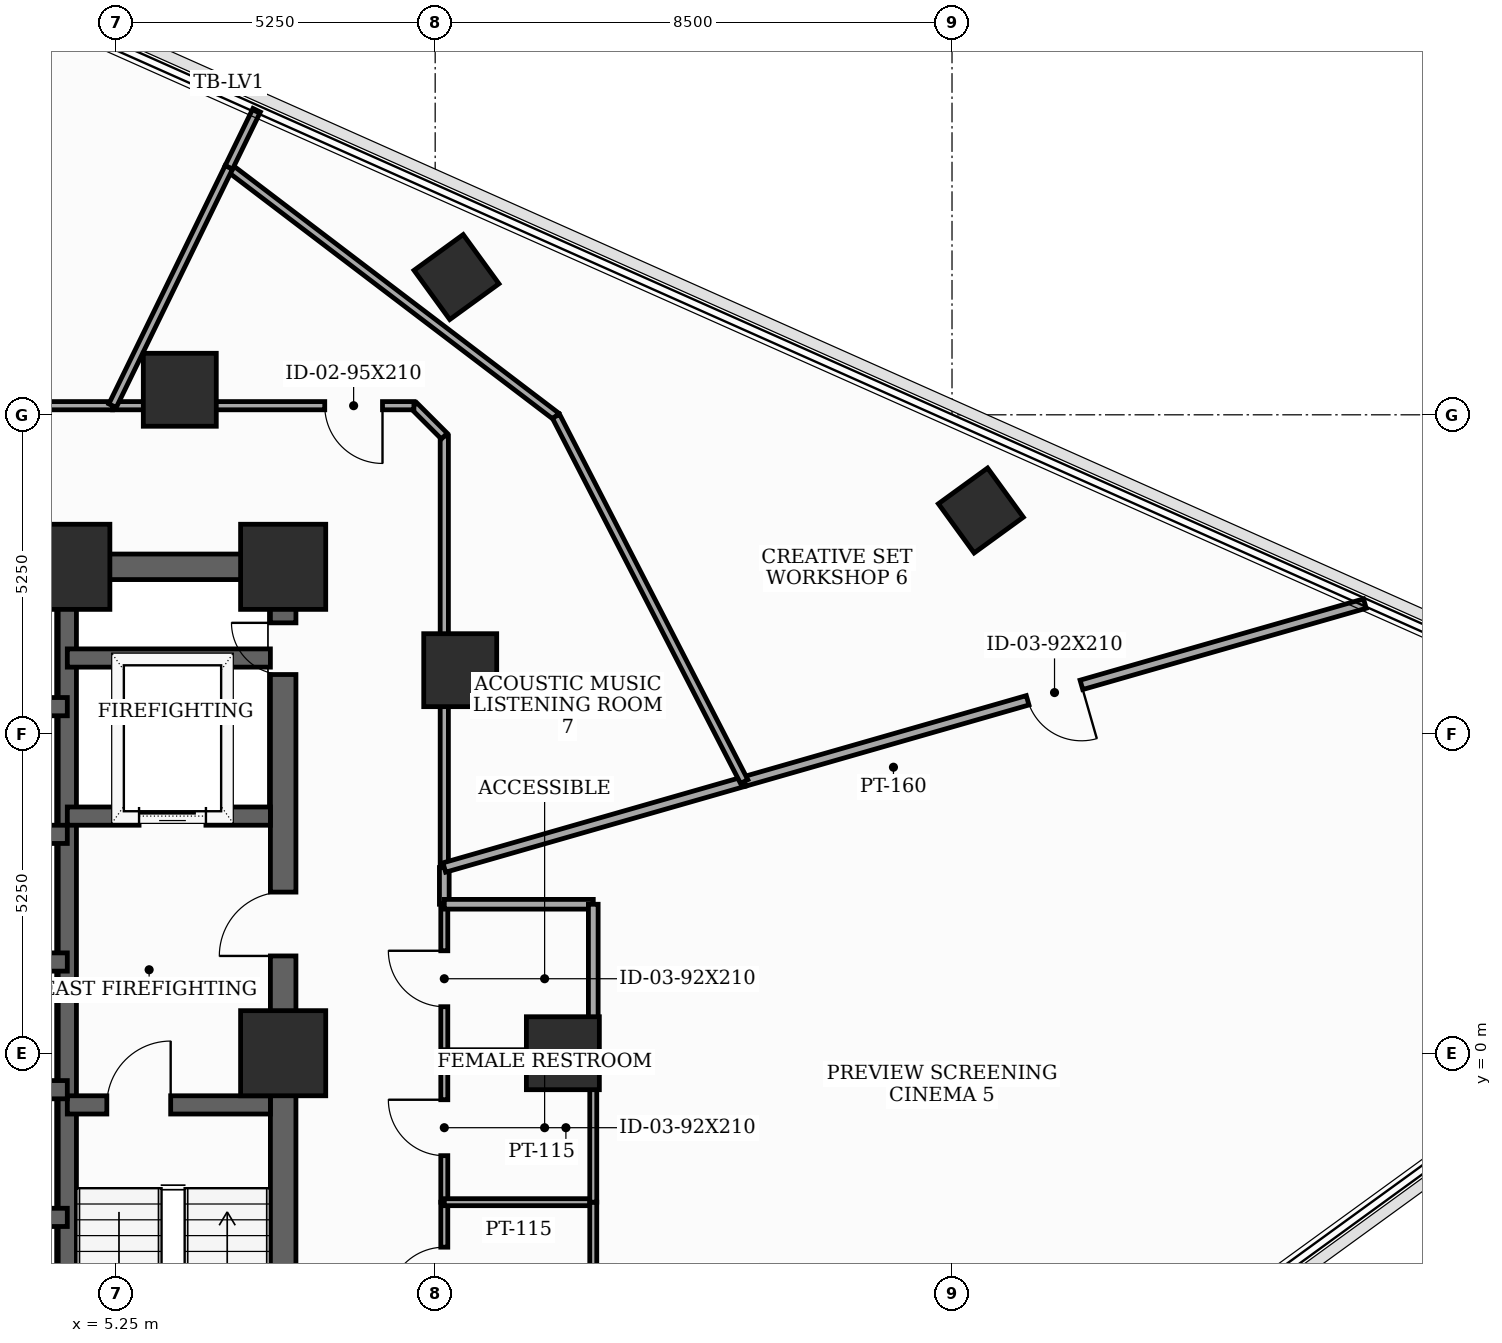
"""IFC4 building model, lengths in metres.
Left out: names, types, materials, properties, quantities, classifications, styles, units other than length and angle.
Written with IfcOpenShell. Run it as: python <this file> out.ifc"""

import sys

from ifc_helpers import new_model, si_unit, direction, frame, frame_2d, origin, origin_2d, place, context, subcontext, project, spatial, rectangle, extrude, element, fill, save


model = new_model("IFC4")
c1 = context("Model", 3, precision=1e-05, world=origin(), true_north=direction((0.0, 1.0)))
c2 = subcontext(c1, "Body", "Model", "MODEL_VIEW")
j1 = project(units=[si_unit("LENGTHUNIT", "METRE"), si_unit("PLANEANGLEUNIT", "RADIAN")], contexts=[c1])
p1 = place(None, origin())
s1 = spatial("IfcSite", under=j1, at=p1, CompositionType="ELEMENT")
p2 = place(p1, origin())
s2 = spatial("IfcBuilding", under=s1, at=p2, CompositionType="ELEMENT")
p3 = place(p2, frame((0.0, 0.0, 162.0)))
s3 = spatial("IfcBuildingStorey", under=s2, at=p3, CompositionType="ELEMENT", Elevation=162.0)
for number, where, z_axis, x_axis in (
    (1, (8.0, 0.0, 0.0), (0.0, 0.0, 1.0), (1.0, 0.0, 0.0)),
    (2, (8.0, 8.0, 0.0), (0.0, 0.0, 1.0), (1.0, 0.0, 0.0)),
    (3, (4.45, 8.0, 0.0), (0.0, 0.0, 1.0), (1.0, 0.0, 0.0)),
):
    element("IfcColumn", number, at=place(p3, frame(where, z_axis=z_axis, x_axis=x_axis)), inside=s3, PredefinedType="COLUMN", context=c2, shape_type="SweptSolid", body=[
        extrude(rectangle(XDim=1.4, YDim=1.4, at=origin_2d()), origin(), (0.0, 0.0, 1.0), 3.7),
    ])
for number, where, z_axis, x_axis in (
    (4, (12.6, 0.0, 0.0), (0.0, 0.0, 1.0), (1.0, 0.0, 0.0)),
    (5, (10.912, 6.3, 0.0), (0.0, 0.0, 1.0), (1.0, 0.0, 0.0)),
    (6, (6.3, 10.912, 0.0), (0.0, 0.0, 1.0), (1.0, 0.0, 0.0)),
):
    element("IfcColumn", number, at=place(p3, frame(where, z_axis=z_axis, x_axis=x_axis)), inside=s3, PredefinedType="COLUMN", context=c2, shape_type="SweptSolid", body=[
        extrude(rectangle(XDim=1.2, YDim=1.2, at=origin_2d()), origin(), (0.0, 0.0, 1.0), 3.7),
    ])
for number, where, z_axis, x_axis in (
    (7, (19.474, 8.926, 0.0), (0.0, 0.0, 1.0), (0.809, 0.588, 0.0)),
    (8, (10.85, 12.766, 0.0), (0.0, 0.0, 1.0), (0.809, 0.588, 0.0)),
):
    element("IfcColumn", number, at=place(p3, frame(where, z_axis=z_axis, x_axis=x_axis)), inside=s3, PredefinedType="COLUMN", context=c2, shape_type="SweptSolid", body=[
        extrude(rectangle(XDim=1.0, YDim=1.0, at=origin_2d()), origin(), (0.0, 0.0, 1.0), 3.7),
    ])
p4 = place(p3, frame((8.0, -8.0, 0.0), z_axis=(0.0, 0.0, 1.0), x_axis=(0.0, 1.0, 0.0)))
e9 = element("IfcWall", 9, at=p4, inside=s3, PredefinedType="SHEAR", context=c2, shape_type="SweptSolid", body=[
    extrude(rectangle(XDim=16.0, YDim=0.42, at=frame_2d((8.0, 0.0))), origin(), (0.0, 0.0, 1.0), 3.5),
])
p5 = place(p4, frame((9.6, 0.0, 0.0)))
e10 = element("IfcOpeningElement", 10, at=p5, cuts=e9, PredefinedType="OPENING", context=c2, shape_type="SweptSolid", body=[
    extrude(rectangle(XDim=1.05, YDim=2.15, at=frame_2d((0.525, 1.075))), frame((0.0, 0.22, 0.0), z_axis=(0.0, -1.0, 0.0), x_axis=(1.0, 0.0, 0.0)), (0.0, 0.0, 1.0), 0.44),
])
p6 = place(p4, frame((14.229, 0.0, 0.0)))
e11 = element("IfcOpeningElement", 11, at=p6, cuts=e9, PredefinedType="OPENING", context=c2, shape_type="SweptSolid", body=[
    extrude(rectangle(XDim=0.85, YDim=2.02, at=frame_2d((0.425, 1.01))), frame((0.0, 0.22, 0.0), z_axis=(0.0, -1.0, 0.0), x_axis=(1.0, 0.0, 0.0)), (0.0, 0.0, 1.0), 0.44),
])
p7 = place(p3, frame((-8.0, 8.0, 0.0), z_axis=(0.0, 0.0, 1.0), x_axis=(1.0, 0.0, 0.0)))
e12 = element("IfcWall", 12, at=p7, inside=s3, PredefinedType="SHEAR", context=c2, shape_type="SweptSolid", body=[
    extrude(rectangle(XDim=16.0, YDim=0.42, at=frame_2d((8.0, 0.0))), origin(), (0.0, 0.0, 1.0), 3.5),
])
p8 = place(p7, frame((7.1, 0.0, 0.0)))
e13 = element("IfcOpeningElement", 13, at=p8, cuts=e12, PredefinedType="OPENING", context=c2, shape_type="SweptSolid", body=[
    extrude(rectangle(XDim=1.8, YDim=2.15, at=frame_2d((0.9, 1.075))), frame((0.0, 0.22, 0.0), z_axis=(0.0, -1.0, 0.0), x_axis=(1.0, 0.0, 0.0)), (0.0, 0.0, 1.0), 0.44),
])
p9 = place(p3, frame((4.45, -7.79, 0.0), z_axis=(0.0, 0.0, 1.0), x_axis=(0.0, 1.0, 0.0)))
e14 = element("IfcWall", 14, at=p9, inside=s3, PredefinedType="SHEAR", context=c2, shape_type="SweptSolid", body=[
    extrude(rectangle(XDim=15.58, YDim=0.3, at=frame_2d((7.79, 0.0))), origin(), (0.0, 0.0, 1.0), 3.5),
])
p10 = place(p3, frame((4.45, -0.85, 0.0), z_axis=(0.0, 0.0, 1.0), x_axis=(1.0, 0.0, 0.0)))
e15 = element("IfcWall", 15, at=p10, inside=s3, PredefinedType="SHEAR", context=c2, shape_type="SweptSolid", body=[
    extrude(rectangle(XDim=3.34, YDim=0.3, at=frame_2d((1.67, 0.0))), origin(), (0.0, 0.0, 1.0), 3.5),
])
p11 = place(p10, frame((0.65, 0.0, 0.0)))
e16 = element("IfcOpeningElement", 16, at=p11, cuts=e15, PredefinedType="OPENING", context=c2, shape_type="SweptSolid", body=[
    extrude(rectangle(XDim=1.05, YDim=2.15, at=frame_2d((0.525, 1.075))), frame((0.0, 0.16, 0.0), z_axis=(0.0, -1.0, 0.0), x_axis=(1.0, 0.0, 0.0)), (0.0, 0.0, 1.0), 0.32),
])
p12 = place(p3, frame((4.45, 3.9, 0.0), z_axis=(0.0, 0.0, 1.0), x_axis=(1.0, 0.0, 0.0)))
e17 = element("IfcWall", 17, at=p12, inside=s3, PredefinedType="SHEAR", context=c2, shape_type="SweptSolid", body=[
    extrude(rectangle(XDim=3.34, YDim=0.3, at=frame_2d((1.67, 0.0))), origin(), (0.0, 0.0, 1.0), 3.5),
])
p13 = place(p12, frame((1.18, 0.0, 0.0)))
e18 = element("IfcOpeningElement", 18, at=p13, cuts=e17, PredefinedType="OPENING", context=c2, shape_type="SweptSolid", body=[
    extrude(rectangle(XDim=1.1, YDim=2.1, at=frame_2d((0.55, 1.05))), frame((0.0, 0.16, 0.0), z_axis=(0.0, -1.0, 0.0), x_axis=(1.0, 0.0, 0.0)), (0.0, 0.0, 1.0), 0.32),
])
p14 = place(p3, frame((4.45, 6.5, 0.0), z_axis=(0.0, 0.0, 1.0), x_axis=(1.0, 0.0, 0.0)))
e19 = element("IfcWall", 19, at=p14, inside=s3, PredefinedType="SHEAR", context=c2, shape_type="SweptSolid", body=[
    extrude(rectangle(XDim=3.34, YDim=0.3, at=frame_2d((1.67, 0.0))), origin(), (0.0, 0.0, 1.0), 3.5),
])
for number, where, z_axis, x_axis in (
    (20, (1.68, 1.5, 0.0), (0.0, 0.0, 1.0), (1.0, 0.0, 0.0)),
    (21, (1.68, 3.6, 0.0), (0.0, 0.0, 1.0), (1.0, 0.0, 0.0)),
    (22, (1.68, 5.7, 0.0), (0.0, 0.0, 1.0), (1.0, 0.0, 0.0)),
    (23, (1.68, -2.7, 0.0), (0.0, 0.0, 1.0), (1.0, 0.0, 0.0)),
    (24, (1.68, -0.6, 0.0), (0.0, 0.0, 1.0), (1.0, 0.0, 0.0)),
):
    element("IfcWall", number, at=place(p3, frame(where, z_axis=z_axis, x_axis=x_axis)), inside=s3, PredefinedType="SHEAR", context=c2, shape_type="SweptSolid", body=[
        extrude(rectangle(XDim=2.77, YDim=0.3, at=frame_2d((1.385, 0.0))), origin(), (0.0, 0.0, 1.0), 3.5),
    ])
p15 = place(p3, frame((10.65, -4.85, 0.0), z_axis=(0.0, 0.0, 1.0), x_axis=(0.0, 1.0, 0.0)))
e25 = element("IfcWall", 25, at=p15, inside=s3, PredefinedType="PARTITIONING", context=c2, shape_type="SweptSolid", body=[
    extrude(rectangle(XDim=2.4, YDim=0.115, at=frame_2d((1.2, 0.0))), origin(), (0.0, 0.0, 1.0), 3.5),
])
p16 = place(p15, frame((0.74, 0.0, 0.0)))
e26 = element("IfcOpeningElement", 26, at=p16, cuts=e25, PredefinedType="OPENING", context=c2, shape_type="SweptSolid", body=[
    extrude(rectangle(XDim=0.92, YDim=2.1, at=frame_2d((0.46, 1.05))), frame((0.0, 0.067, 0.0), z_axis=(0.0, -1.0, 0.0), x_axis=(1.0, 0.0, 0.0)), (0.0, 0.0, 1.0), 0.135),
])
p17 = place(p3, frame((10.65, -2.45, 0.0), z_axis=(0.0, 0.0, 1.0), x_axis=(0.0, 1.0, 0.0)))
e27 = element("IfcWall", 27, at=p17, inside=s3, PredefinedType="PARTITIONING", context=c2, shape_type="SweptSolid", body=[
    extrude(rectangle(XDim=2.45, YDim=0.115, at=frame_2d((1.225, 0.0))), origin(), (0.0, 0.0, 1.0), 2.885),
])
p18 = place(p17, frame((0.765, 0.0, 0.0)))
e28 = element("IfcOpeningElement", 28, at=p18, cuts=e27, PredefinedType="OPENING", context=c2, shape_type="SweptSolid", body=[
    extrude(rectangle(XDim=0.92, YDim=2.1, at=frame_2d((0.46, 1.05))), frame((0.0, 0.067, 0.0), z_axis=(0.0, -1.0, 0.0), x_axis=(1.0, 0.0, 0.0)), (0.0, 0.0, 1.0), 0.135),
])
p19 = place(p3, frame((10.65, 2.45, 0.0), z_axis=(0.0, 0.0, 1.0), x_axis=(0.0, 1.0, 0.0)))
e29 = element("IfcWall", 29, at=p19, inside=s3, PredefinedType="PARTITIONING", context=c2, shape_type="SweptSolid", body=[
    extrude(rectangle(XDim=0.604, YDim=0.16, at=frame_2d((0.302, 0.0))), origin(), (0.0, 0.0, 1.0), 3.5),
])
p20 = place(p3, frame((10.65, 0.0, 0.0), z_axis=(0.0, 0.0, 1.0), x_axis=(0.0, 1.0, 0.0)))
e30 = element("IfcWall", 30, at=p20, inside=s3, PredefinedType="PARTITIONING", context=c2, shape_type="SweptSolid", body=[
    extrude(rectangle(XDim=2.45, YDim=0.115, at=frame_2d((1.225, 0.0))), origin(), (0.0, 0.0, 1.0), 2.885),
])
p21 = place(p20, frame((0.765, 0.0, 0.0)))
e31 = element("IfcOpeningElement", 31, at=p21, cuts=e30, PredefinedType="OPENING", context=c2, shape_type="SweptSolid", body=[
    extrude(rectangle(XDim=0.92, YDim=2.1, at=frame_2d((0.46, 1.05))), frame((0.0, 0.067, 0.0), z_axis=(0.0, -1.0, 0.0), x_axis=(1.0, 0.0, 0.0)), (0.0, 0.0, 1.0), 0.135),
])
p22 = place(p3, frame((10.65, 3.054, 0.0), z_axis=(0.0, 0.0, 1.0), x_axis=(0.0, 1.0, 0.0)))
e32 = element("IfcWall", 32, at=p22, inside=s3, PredefinedType="PARTITIONING", context=c2, shape_type="SweptSolid", body=[
    extrude(rectangle(XDim=7.096, YDim=0.135, at=frame_2d((3.548, 0.0))), origin(), (0.0, 0.0, 1.0), 2.885),
])
p23 = place(p3, frame((10.65, 10.15, 0.0), z_axis=(0.0, 0.0, 1.0), x_axis=(-0.707106781187, 0.707106781187, 0.0)))
e33 = element("IfcWall", 33, at=p23, inside=s3, PredefinedType="PARTITIONING", context=c2, shape_type="SweptSolid", body=[
    extrude(rectangle(XDim=0.707, YDim=0.135, at=frame_2d((0.354, 0.0))), origin(), (0.0, 0.0, 1.0), 3.5),
])
p24 = place(p3, frame((10.15, 10.65, 0.0), z_axis=(0.0, 0.0, 1.0), x_axis=(-1.0, 0.0, 0.0)))
e34 = element("IfcWall", 34, at=p24, inside=s3, PredefinedType="PARTITIONING", context=c2, shape_type="SweptSolid", body=[
    extrude(rectangle(XDim=4.956, YDim=0.135, at=frame_2d((2.478, 0.0))), origin(), (0.0, 0.0, 1.0), 2.885),
])
p25 = place(p24, frame((0.516, 0.0, 0.0)))
e35 = element("IfcOpeningElement", 35, at=p25, cuts=e34, PredefinedType="OPENING", context=c2, shape_type="SweptSolid", body=[
    extrude(rectangle(XDim=0.95, YDim=2.1, at=frame_2d((0.475, 1.05))), frame((0.0, 0.077, 0.0), z_axis=(0.0, -1.0, 0.0), x_axis=(1.0, 0.0, 0.0)), (0.0, 0.0, 1.0), 0.155),
])
p26 = place(p3, frame((5.194, 10.65, 0.0), z_axis=(0.0, 0.0, 1.0), x_axis=(-1.0, 0.0, 0.0)))
e36 = element("IfcWall", 36, at=p26, inside=s3, PredefinedType="PARTITIONING", context=c2, shape_type="SweptSolid", body=[
    extrude(rectangle(XDim=11.343, YDim=0.135, at=frame_2d((5.671, 0.0))), origin(), (0.0, 0.0, 1.0), 2.885),
])
p27 = place(p26, frame((6.558, 0.0, 0.0)))
e37 = element("IfcOpeningElement", 37, at=p27, cuts=e36, PredefinedType="OPENING", context=c2, shape_type="SweptSolid", body=[
    extrude(rectangle(XDim=0.95, YDim=2.1, at=frame_2d((0.475, 1.05))), frame((0.0, 0.077, 0.0), z_axis=(0.0, -1.0, 0.0), x_axis=(1.0, 0.0, 0.0)), (0.0, 0.0, 1.0), 0.155),
])
p28 = place(p3, frame((13.1, -2.45, 0.0), z_axis=(0.0, 0.0, 1.0), x_axis=(-1.0, 0.0, 0.0)))
e38 = element("IfcWall", 38, at=p28, inside=s3, PredefinedType="PARTITIONING", context=c2, shape_type="SweptSolid", body=[
    extrude(rectangle(XDim=2.45, YDim=0.115, at=frame_2d((1.225, 0.0))), origin(), (0.0, 0.0, 1.0), 2.885),
])
p29 = place(p3, frame((13.1, -4.85, 0.0), z_axis=(0.0, 0.0, 1.0), x_axis=(0.0, 1.0, 0.0)))
e39 = element("IfcWall", 39, at=p29, inside=s3, PredefinedType="PARTITIONING", context=c2, shape_type="SweptSolid", body=[
    extrude(rectangle(XDim=2.4, YDim=0.115, at=frame_2d((1.2, 0.0))), origin(), (0.0, 0.0, 1.0), 3.5),
])
p30 = place(p3, frame((13.1, -2.45, 0.0), z_axis=(0.0, 0.0, 1.0), x_axis=(0.0, 1.0, 0.0)))
e40 = element("IfcWall", 40, at=p30, inside=s3, PredefinedType="PARTITIONING", context=c2, shape_type="SweptSolid", body=[
    extrude(rectangle(XDim=2.45, YDim=0.115, at=frame_2d((1.225, 0.0))), origin(), (0.0, 0.0, 1.0), 2.885),
])
p31 = place(p3, frame((13.1, 0.0, 0.0), z_axis=(0.0, 0.0, 1.0), x_axis=(-1.0, 0.0, 0.0)))
e41 = element("IfcWall", 41, at=p31, inside=s3, PredefinedType="PARTITIONING", context=c2, shape_type="SweptSolid", body=[
    extrude(rectangle(XDim=2.45, YDim=0.115, at=frame_2d((1.225, 0.0))), origin(), (0.0, 0.0, 1.0), 2.885),
])
p32 = place(p3, frame((10.65, 2.45, 0.0), z_axis=(0.0, 0.0, 1.0), x_axis=(1.0, 0.0, 0.0)))
e42 = element("IfcWall", 42, at=p32, inside=s3, PredefinedType="PARTITIONING", context=c2, shape_type="SweptSolid", body=[
    extrude(rectangle(XDim=2.45, YDim=0.16, at=frame_2d((1.225, 0.0))), origin(), (0.0, 0.0, 1.0), 2.885),
])
p33 = place(p3, frame((13.1, 2.45, 0.0), z_axis=(0.0, 0.0, 1.0), x_axis=(0.0, -1.0, 0.0)))
e43 = element("IfcWall", 43, at=p33, inside=s3, PredefinedType="PARTITIONING", context=c2, shape_type="SweptSolid", body=[
    extrude(rectangle(XDim=2.45, YDim=0.16, at=frame_2d((1.225, 0.0))), origin(), (0.0, 0.0, 1.0), 3.5),
])
p34 = place(p3, frame((25.79, 7.395, 0.0), z_axis=(0.0, 0.0, 1.0), x_axis=(-0.961256282332, -0.275656234607, 0.0)))
e44 = element("IfcWall", 44, at=p34, inside=s3, PredefinedType="PARTITIONING", context=c2, shape_type="SweptSolid", body=[
    extrude(rectangle(XDim=10.619, YDim=0.16, at=frame_2d((5.31, 0.0))), origin(), (0.0, 0.0, 1.0), 2.985),
])
p35 = place(p34, frame((4.85, 0.0, 0.0)))
e45 = element("IfcOpeningElement", 45, at=p35, cuts=e44, PredefinedType="OPENING", context=c2, shape_type="SweptSolid", body=[
    extrude(rectangle(XDim=0.92, YDim=2.1, at=frame_2d((0.46, 1.05))), frame((0.0, 0.09, 0.0), z_axis=(0.0, -1.0, 0.0), x_axis=(1.0, 0.0, 0.0)), (0.0, 0.0, 1.0), 0.18),
])
p36 = place(p3, frame((15.582, 4.468, 0.0), z_axis=(0.0, 0.0, 1.0), x_axis=(-0.961272163105, -0.275600849852, 0.0)))
e46 = element("IfcWall", 46, at=p36, inside=s3, PredefinedType="PARTITIONING", context=c2, shape_type="SweptSolid", body=[
    extrude(rectangle(XDim=5.131, YDim=0.16, at=frame_2d((2.565, 0.0))), origin(), (0.0, 0.0, 1.0), 2.885),
])
p37 = place(p3, frame((7.106, 14.569, 0.0), z_axis=(0.0, 0.0, 1.0), x_axis=(0.795990968219, -0.60530849863, 0.0)))
e47 = element("IfcWall", 47, at=p37, inside=s3, PredefinedType="PARTITIONING", context=c2, shape_type="SweptSolid", body=[
    extrude(rectangle(XDim=6.76, YDim=0.135, at=frame_2d((3.38, 0.0))), origin(), (0.0, 0.0, 1.0), 2.885),
])
p38 = place(p3, frame((12.487, 10.477, 0.0), z_axis=(0.0, 0.0, 1.0), x_axis=(0.457887389752, -0.889010201464, 0.0)))
e48 = element("IfcWall", 48, at=p38, inside=s3, PredefinedType="PARTITIONING", context=c2, shape_type="SweptSolid", body=[
    extrude(rectangle(XDim=6.759, YDim=0.135, at=frame_2d((3.38, 0.0))), origin(), (0.0, 0.0, 1.0), 2.885),
])
p39 = place(p3, frame((7.564, 15.51, 0.0), z_axis=(0.0, 0.0, 1.0), x_axis=(-0.438230528202, -0.898862616951, 0.0)))
e49 = element("IfcWall", 49, at=p39, inside=s3, PredefinedType="PARTITIONING", context=c2, shape_type="SweptSolid", body=[
    extrude(rectangle(XDim=1.046, YDim=0.135, at=frame_2d((0.523, 0.0))), origin(), (0.0, 0.0, 1.0), 2.985),
])
p40 = place(p3, frame((7.106, 14.569, 0.0), z_axis=(0.0, 0.0, 1.0), x_axis=(-0.43843576568, -0.898762526684, 0.0)))
e50 = element("IfcWall", 50, at=p40, inside=s3, PredefinedType="PARTITIONING", context=c2, shape_type="SweptSolid", body=[
    extrude(rectangle(XDim=4.361, YDim=0.135, at=frame_2d((2.18, 0.0))), origin(), (0.0, 0.0, 1.0), 2.885),
])
p41 = place(p5, origin())
e51 = element("IfcDoor", 51, at=p41, inside=s3, OperationType="SINGLE_SWING_LEFT", PredefinedType="DOOR", context=c2, shape_type="SweptSolid", body=[
    extrude(rectangle(XDim=1.05, YDim=2.15, at=frame_2d((0.525, 1.075))), frame((0.0, 0.025, 0.0), z_axis=(0.0, -1.0, 0.0), x_axis=(1.0, 0.0, 0.0)), (0.0, 0.0, 1.0), 0.05),
])
fill(e10, e51)
p42 = place(p6, origin())
e52 = element("IfcDoor", 52, at=p42, inside=s3, OperationType="SINGLE_SWING_RIGHT", PredefinedType="TRAPDOOR", context=c2, shape_type="SweptSolid", body=[
    extrude(rectangle(XDim=0.85, YDim=2.02, at=frame_2d((0.425, 1.01))), frame((0.0, 0.025, 0.0), z_axis=(0.0, -1.0, 0.0), x_axis=(1.0, 0.0, 0.0)), (0.0, 0.0, 1.0), 0.05),
])
fill(e11, e52)
p43 = place(p11, origin())
e53 = element("IfcDoor", 53, at=p43, inside=s3, OperationType="SINGLE_SWING_RIGHT", PredefinedType="DOOR", context=c2, shape_type="SweptSolid", body=[
    extrude(rectangle(XDim=1.05, YDim=2.15, at=frame_2d((0.525, 1.075))), frame((0.0, 0.025, 0.0), z_axis=(0.0, -1.0, 0.0), x_axis=(1.0, 0.0, 0.0)), (0.0, 0.0, 1.0), 0.05),
])
fill(e16, e53)
p44 = place(p13, origin())
e54 = element("IfcDoor", 54, at=p44, inside=s3, OperationType="SLIDING_TO_LEFT", PredefinedType="DOOR", context=c2, shape_type="SweptSolid", body=[
    extrude(rectangle(XDim=1.1, YDim=2.1, at=frame_2d((0.55, 1.05))), frame((0.0, 0.025, 0.0), z_axis=(0.0, -1.0, 0.0), x_axis=(1.0, 0.0, 0.0)), (0.0, 0.0, 1.0), 0.05),
])
fill(e18, e54)
p45 = place(p16, origin())
e55 = element("IfcDoor", 55, at=p45, inside=s3, OperationType="SINGLE_SWING_LEFT", PredefinedType="DOOR", context=c2, shape_type="SweptSolid", body=[
    extrude(rectangle(XDim=0.92, YDim=2.1, at=frame_2d((0.46, 1.05))), frame((0.0, 0.025, 0.0), z_axis=(0.0, -1.0, 0.0), x_axis=(1.0, 0.0, 0.0)), (0.0, 0.0, 1.0), 0.05),
])
fill(e26, e55)
p46 = place(p18, origin())
e56 = element("IfcDoor", 56, at=p46, inside=s3, OperationType="SINGLE_SWING_RIGHT", PredefinedType="DOOR", context=c2, shape_type="SweptSolid", body=[
    extrude(rectangle(XDim=0.92, YDim=2.1, at=frame_2d((0.46, 1.05))), frame((0.0, 0.025, 0.0), z_axis=(0.0, -1.0, 0.0), x_axis=(1.0, 0.0, 0.0)), (0.0, 0.0, 1.0), 0.05),
])
fill(e28, e56)
p47 = place(p21, origin())
e57 = element("IfcDoor", 57, at=p47, inside=s3, OperationType="SINGLE_SWING_RIGHT", PredefinedType="DOOR", context=c2, shape_type="SweptSolid", body=[
    extrude(rectangle(XDim=0.92, YDim=2.1, at=frame_2d((0.46, 1.05))), frame((0.0, 0.025, 0.0), z_axis=(0.0, -1.0, 0.0), x_axis=(1.0, 0.0, 0.0)), (0.0, 0.0, 1.0), 0.05),
])
fill(e31, e57)
p48 = place(p25, origin())
e58 = element("IfcDoor", 58, at=p48, inside=s3, OperationType="SINGLE_SWING_LEFT", PredefinedType="DOOR", context=c2, shape_type="SweptSolid", body=[
    extrude(rectangle(XDim=0.95, YDim=2.1, at=frame_2d((0.475, 1.05))), frame((0.0, 0.025, 0.0), z_axis=(0.0, -1.0, 0.0), x_axis=(1.0, 0.0, 0.0)), (0.0, 0.0, 1.0), 0.05),
])
fill(e35, e58)
p49 = place(p35, origin())
e59 = element("IfcDoor", 59, at=p49, inside=s3, OperationType="SINGLE_SWING_LEFT", PredefinedType="DOOR", context=c2, shape_type="SweptSolid", body=[
    extrude(rectangle(XDim=0.92, YDim=2.1, at=frame_2d((0.46, 1.05))), frame((0.0, 0.025, 0.0), z_axis=(0.0, -1.0, 0.0), x_axis=(1.0, 0.0, 0.0)), (0.0, 0.0, 1.0), 0.05),
])
fill(e45, e59)
save(model, sys.argv[1])
